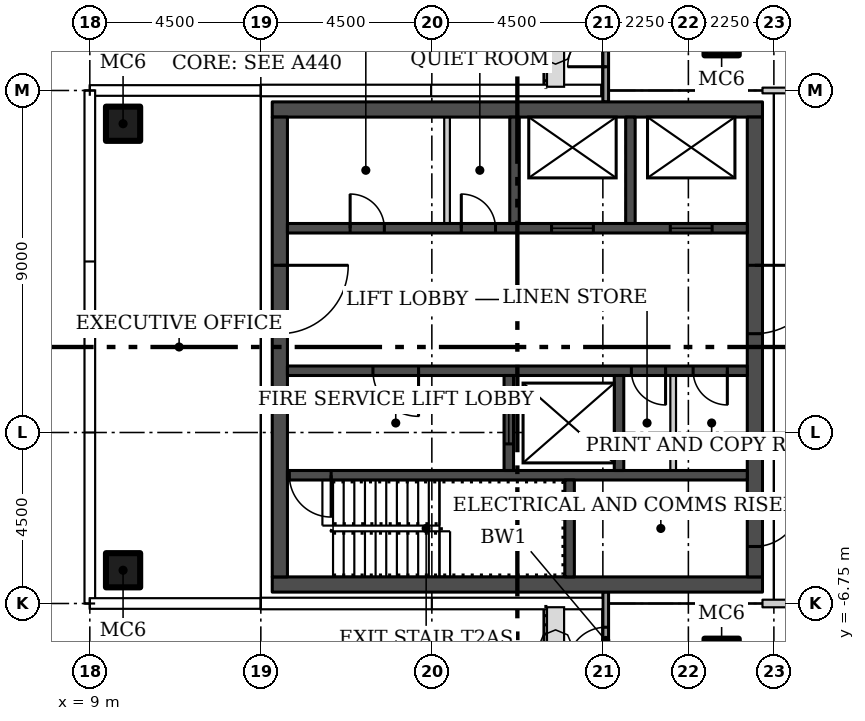
"""IFC4 building model, lengths in metres.
Left out: names, types, materials, properties, quantities, classifications, styles, units other than length and angle.
Written with IfcOpenShell. Run it as: python <this file> out.ifc"""

import sys

from ifc_helpers import new_model, si_unit, direction, frame, frame_2d, origin, origin_2d, place, context, subcontext, project, spatial, rectangle, hollow_rectangle, extrude, element, fill, save


model = new_model("IFC4")
c1 = context("Model", 3, precision=1e-05, world=origin(), true_north=direction((0.0, 1.0)))
c2 = subcontext(c1, "Body", "Model", "MODEL_VIEW")
j1 = project(units=[si_unit("LENGTHUNIT", "METRE"), si_unit("PLANEANGLEUNIT", "RADIAN")], contexts=[c1])
p1 = place(None, origin())
s1 = spatial("IfcSite", under=j1, at=p1, CompositionType="ELEMENT")
p2 = place(p1, origin())
s2 = spatial("IfcBuilding", under=s1, at=p2, CompositionType="ELEMENT")
p3 = place(p2, frame((0.0, 0.0, 242.1)))
s3 = spatial("IfcBuildingStorey", under=s2, at=p3, CompositionType="ELEMENT", Elevation=242.1)
for number, where in (
    (1, (25.625, 8.125, 0.0)),
    (2, (25.625, -8.125, 0.0)),
    (3, (9.875, -5.875, 0.0)),
    (4, (9.875, 5.875, 0.0)),
):
    element("IfcColumn", number, at=place(p3, frame(where)), inside=s3, PredefinedType="COLUMN", context=c2, shape_type="SweptSolid", body=[
        extrude(hollow_rectangle(XDim=0.9, YDim=0.9, WallThickness=0.036, at=origin_2d()), origin(), (0.0, 0.0, 1.0), 3.55),
    ])
p4 = place(p3, frame((26.7, 6.75, 0.0)))
e5 = element("IfcWall", 5, at=p4, inside=s3, PredefinedType="PARTITIONING", context=c2, shape_type="SweptSolid", body=[
    extrude(rectangle(XDim=14.1, YDim=0.15, at=frame_2d((7.05, 0.0))), origin(), (0.0, 0.0, 1.0), 3.55),
])
p5 = place(p4, frame((6.3, 0.0, 0.0)))
e6 = element("IfcOpeningElement", 6, at=p5, cuts=e5, PredefinedType="OPENING", context=c2, shape_type="SweptSolid", body=[
    extrude(rectangle(XDim=1.5, YDim=2.1, at=frame_2d((0.75, 1.05))), frame((0.0, 0.085, 0.0), z_axis=(0.0, -1.0, 0.0), x_axis=(1.0, 0.0, 0.0)), (0.0, 0.0, 1.0), 0.17),
])
p6 = place(p3, frame((26.7, -6.75, 0.0)))
e7 = element("IfcWall", 7, at=p6, inside=s3, PredefinedType="PARTITIONING", context=c2, shape_type="SweptSolid", body=[
    extrude(rectangle(XDim=9.4, YDim=0.2, at=frame_2d((4.7, 0.0))), origin(), (0.0, 0.0, 1.0), 3.55),
])
p7 = place(p6, frame((6.75, 0.0, 0.0)))
e8 = element("IfcOpeningElement", 8, at=p7, cuts=e7, PredefinedType="OPENING", context=c2, shape_type="SweptSolid", body=[
    extrude(rectangle(XDim=1.5, YDim=2.4, at=frame_2d((0.75, 1.2))), frame((0.0, 0.11, 0.0), z_axis=(0.0, -1.0, 0.0), x_axis=(1.0, 0.0, 0.0)), (0.0, 0.0, 1.0), 0.22),
])
p8 = place(p6, frame((1.35, 0.0, 0.0)))
e9 = element("IfcOpeningElement", 9, at=p8, cuts=e7, PredefinedType="OPENING", context=c2, shape_type="SweptSolid", body=[
    extrude(rectangle(XDim=1.5, YDim=2.4, at=frame_2d((0.75, 1.2))), frame((0.0, 0.11, 0.0), z_axis=(0.0, -1.0, 0.0), x_axis=(1.0, 0.0, 0.0)), (0.0, 0.0, 1.0), 0.22),
])
p9 = place(p3, frame((22.575, 6.448, 0.0), z_axis=(0.0, 0.0, 1.0), x_axis=(0.0, 1.0, 0.0)))
e10 = element("IfcWall", 10, at=p9, inside=s3, PredefinedType="SOLIDWALL", context=c2, shape_type="SweptSolid", body=[
    extrude(rectangle(XDim=2.552, YDim=0.15, at=frame_2d((1.276, 0.0))), origin(), (0.0, 0.0, 1.0), 3.45),
])
p10 = place(p9, frame((0.927, 0.0, 0.0)))
e11 = element("IfcOpeningElement", 11, at=p10, cuts=e10, PredefinedType="OPENING", context=c2, shape_type="SweptSolid", body=[
    extrude(rectangle(XDim=1.0, YDim=2.4, at=frame_2d((0.5, 1.2))), frame((0.0, 0.085, 0.0), z_axis=(0.0, -1.0, 0.0), x_axis=(1.0, 0.0, 0.0)), (0.0, 0.0, 1.0), 0.17),
])
p11 = place(p3, frame((22.575, -9.0, 0.0), z_axis=(0.0, 0.0, 1.0), x_axis=(0.0, 1.0, 0.0)))
e12 = element("IfcWall", 12, at=p11, inside=s3, PredefinedType="SOLIDWALL", context=c2, shape_type="SweptSolid", body=[
    extrude(rectangle(XDim=2.557, YDim=0.15, at=frame_2d((1.278, 0.0))), origin(), (0.0, 0.0, 1.0), 3.45),
])
p12 = place(p11, frame((0.625, 0.0, 0.0)))
e13 = element("IfcOpeningElement", 13, at=p12, cuts=e12, PredefinedType="OPENING", context=c2, shape_type="SweptSolid", body=[
    extrude(rectangle(XDim=1.0, YDim=2.4, at=frame_2d((0.5, 1.2))), frame((0.0, 0.085, 0.0), z_axis=(0.0, -1.0, 0.0), x_axis=(1.0, 0.0, 0.0)), (0.0, 0.0, 1.0), 0.17),
])
for number, where in (
    (14, (13.8, -6.25, 0.0)),
    (15, (13.8, 6.25, 0.0)),
):
    element("IfcWall", number, at=place(p3, frame(where)), inside=s3, PredefinedType="SHEAR", context=c2, shape_type="SweptSolid", body=[
        extrude(rectangle(XDim=12.9, YDim=0.4, at=frame_2d((6.45, 0.0))), origin(), (0.0, 0.0, 1.0), 3.55),
    ])
p13 = place(p3, frame((14.0, 6.05, 0.0), z_axis=(0.0, 0.0, 1.0), x_axis=(0.0, -1.0, 0.0)))
e16 = element("IfcWall", 16, at=p13, inside=s3, PredefinedType="SHEAR", context=c2, shape_type="SweptSolid", body=[
    extrude(rectangle(XDim=12.1, YDim=0.4, at=frame_2d((6.05, 0.0))), origin(), (0.0, 0.0, 1.0), 3.55),
])
p14 = place(p13, frame((3.9, 0.0, 0.0)))
e17 = element("IfcOpeningElement", 17, at=p14, cuts=e16, PredefinedType="OPENING", context=c2, shape_type="SweptSolid", body=[
    extrude(rectangle(XDim=1.8, YDim=2.4, at=frame_2d((0.9, 1.2))), frame((0.0, 0.21, 0.0), z_axis=(0.0, -1.0, 0.0), x_axis=(1.0, 0.0, 0.0)), (0.0, 0.0, 1.0), 0.42),
])
p15 = place(p3, frame((26.5, 6.05, 0.0), z_axis=(0.0, 0.0, 1.0), x_axis=(0.0, -1.0, 0.0)))
e18 = element("IfcWall", 18, at=p15, inside=s3, PredefinedType="SHEAR", context=c2, shape_type="SweptSolid", body=[
    extrude(rectangle(XDim=12.1, YDim=0.4, at=frame_2d((6.05, 0.0))), origin(), (0.0, 0.0, 1.0), 3.55),
])
p16 = place(p15, frame((10.1, 0.0, 0.0)))
e19 = element("IfcOpeningElement", 19, at=p16, cuts=e18, PredefinedType="OPENING", context=c2, shape_type="SweptSolid", body=[
    extrude(rectangle(XDim=1.2, YDim=2.1, at=frame_2d((0.6, 1.05))), frame((0.0, 0.21, 0.0), z_axis=(0.0, -1.0, 0.0), x_axis=(1.0, 0.0, 0.0)), (0.0, 0.0, 1.0), 0.42),
])
p17 = place(p15, frame((3.9, 0.0, 0.0)))
e20 = element("IfcOpeningElement", 20, at=p17, cuts=e18, PredefinedType="OPENING", context=c2, shape_type="SweptSolid", body=[
    extrude(rectangle(XDim=1.8, YDim=2.4, at=frame_2d((0.9, 1.2))), frame((0.0, 0.21, 0.0), z_axis=(0.0, -1.0, 0.0), x_axis=(1.0, 0.0, 0.0)), (0.0, 0.0, 1.0), 0.42),
])
p18 = place(p3, frame((26.3, -3.375, 0.0), z_axis=(0.0, 0.0, 1.0), x_axis=(-1.0, 0.0, 0.0)))
e21 = element("IfcWall", 21, at=p18, inside=s3, PredefinedType="SHEAR", context=c2, shape_type="SweptSolid", body=[
    extrude(rectangle(XDim=12.1, YDim=0.25, at=frame_2d((6.05, 0.0))), origin(), (0.0, 0.0, 1.0), 3.55),
])
p19 = place(p18, frame((10.95, 0.0, 0.0)))
e22 = element("IfcOpeningElement", 22, at=p19, cuts=e21, PredefinedType="OPENING", context=c2, shape_type="SweptSolid", body=[
    extrude(rectangle(XDim=1.1, YDim=2.1, at=frame_2d((0.55, 1.05))), frame((0.0, 0.135, 0.0), z_axis=(0.0, -1.0, 0.0), x_axis=(1.0, 0.0, 0.0)), (0.0, 0.0, 1.0), 0.27),
])
p20 = place(p3, frame((21.625, -6.05, 0.0), z_axis=(0.0, 0.0, 1.0), x_axis=(0.0, 1.0, 0.0)))
e23 = element("IfcWall", 23, at=p20, inside=s3, PredefinedType="SHEAR", context=c2, shape_type="SweptSolid", body=[
    extrude(rectangle(XDim=2.55, YDim=0.25, at=frame_2d((1.275, 0.0))), origin(), (0.0, 0.0, 1.0), 3.55),
])
p21 = place(p3, frame((26.3, -0.625, 0.0), z_axis=(0.0, 0.0, 1.0), x_axis=(-1.0, 0.0, 0.0)))
e24 = element("IfcWall", 24, at=p21, inside=s3, PredefinedType="SHEAR", context=c2, shape_type="SweptSolid", body=[
    extrude(rectangle(XDim=12.1, YDim=0.25, at=frame_2d((6.05, 0.0))), origin(), (0.0, 0.0, 1.0), 3.55),
])
p22 = place(p21, frame((8.65, 0.0, 0.0)))
e25 = element("IfcOpeningElement", 25, at=p22, cuts=e24, PredefinedType="OPENING", context=c2, shape_type="SweptSolid", body=[
    extrude(rectangle(XDim=1.2, YDim=2.1, at=frame_2d((0.6, 1.05))), frame((0.0, 0.135, 0.0), z_axis=(0.0, -1.0, 0.0), x_axis=(1.0, 0.0, 0.0)), (0.0, 0.0, 1.0), 0.27),
])
p23 = place(p21, frame((2.15, 0.0, 0.0)))
e26 = element("IfcOpeningElement", 26, at=p23, cuts=e24, PredefinedType="OPENING", context=c2, shape_type="SweptSolid", body=[
    extrude(rectangle(XDim=0.9, YDim=2.1, at=frame_2d((0.45, 1.05))), frame((0.0, 0.135, 0.0), z_axis=(0.0, -1.0, 0.0), x_axis=(1.0, 0.0, 0.0)), (0.0, 0.0, 1.0), 0.27),
])
p24 = place(p21, frame((0.525, 0.0, 0.0)))
e27 = element("IfcOpeningElement", 27, at=p24, cuts=e24, PredefinedType="OPENING", context=c2, shape_type="SweptSolid", body=[
    extrude(rectangle(XDim=0.9, YDim=2.1, at=frame_2d((0.45, 1.05))), frame((0.0, 0.135, 0.0), z_axis=(0.0, -1.0, 0.0), x_axis=(1.0, 0.0, 0.0)), (0.0, 0.0, 1.0), 0.27),
])
p25 = place(p3, frame((20.025, -3.25, 0.0), z_axis=(0.0, 0.0, 1.0), x_axis=(0.0, 1.0, 0.0)))
e28 = element("IfcWall", 28, at=p25, inside=s3, PredefinedType="SHEAR", context=c2, shape_type="SweptSolid", body=[
    extrude(rectangle(XDim=2.5, YDim=0.25, at=frame_2d((1.25, 0.0))), origin(), (0.0, 0.0, 1.0), 3.55),
])
p26 = place(p25, frame((0.7, 0.0, 0.0)))
e29 = element("IfcOpeningElement", 29, at=p26, cuts=e28, PredefinedType="OPENING", context=c2, shape_type="SweptSolid", body=[
    extrude(rectangle(XDim=1.1, YDim=2.1, at=frame_2d((0.55, 1.05))), frame((0.0, 0.135, 0.0), z_axis=(0.0, -1.0, 0.0), x_axis=(1.0, 0.0, 0.0)), (0.0, 0.0, 1.0), 0.27),
])
p27 = place(p3, frame((22.925, -3.25, 0.0), z_axis=(0.0, 0.0, 1.0), x_axis=(0.0, 1.0, 0.0)))
e30 = element("IfcWall", 30, at=p27, inside=s3, PredefinedType="SHEAR", context=c2, shape_type="SweptSolid", body=[
    extrude(rectangle(XDim=2.5, YDim=0.25, at=frame_2d((1.25, 0.0))), origin(), (0.0, 0.0, 1.0), 3.55),
])
p28 = place(p3, frame((24.35, -3.25, 0.0), z_axis=(0.0, 0.0, 1.0), x_axis=(0.0, 1.0, 0.0)))
e31 = element("IfcWall", 31, at=p28, inside=s3, PredefinedType="PARTITIONING", context=c2, shape_type="SweptSolid", body=[
    extrude(rectangle(XDim=2.5, YDim=0.15, at=frame_2d((1.25, 0.0))), origin(), (0.0, 0.0, 1.0), 3.55),
])
p29 = place(p3, frame((14.2, 3.125, 0.0)))
e32 = element("IfcWall", 32, at=p29, inside=s3, PredefinedType="SHEAR", context=c2, shape_type="SweptSolid", body=[
    extrude(rectangle(XDim=12.1, YDim=0.25, at=frame_2d((6.05, 0.0))), origin(), (0.0, 0.0, 1.0), 3.55),
])
p30 = place(p29, frame((6.95, 0.0, 0.0)))
e33 = element("IfcOpeningElement", 33, at=p30, cuts=e32, PredefinedType="OPENING", context=c2, shape_type="SweptSolid", body=[
    extrude(rectangle(XDim=1.1, YDim=2.1, at=frame_2d((0.55, 1.05))), frame((0.0, 0.135, 0.0), z_axis=(0.0, -1.0, 0.0), x_axis=(1.0, 0.0, 0.0)), (0.0, 0.0, 1.0), 0.27),
])
p31 = place(p29, frame((10.075, 0.0, 0.0)))
e34 = element("IfcOpeningElement", 34, at=p31, cuts=e32, PredefinedType="OPENING", context=c2, shape_type="SweptSolid", body=[
    extrude(rectangle(XDim=1.1, YDim=2.1, at=frame_2d((0.55, 1.05))), frame((0.0, 0.135, 0.0), z_axis=(0.0, -1.0, 0.0), x_axis=(1.0, 0.0, 0.0)), (0.0, 0.0, 1.0), 0.27),
])
p32 = place(p29, frame((1.65, 0.0, 0.0)))
e35 = element("IfcOpeningElement", 35, at=p32, cuts=e32, PredefinedType="OPENING", context=c2, shape_type="SweptSolid", body=[
    extrude(rectangle(XDim=0.9, YDim=2.1, at=frame_2d((0.45, 1.05))), frame((0.0, 0.135, 0.0), z_axis=(0.0, -1.0, 0.0), x_axis=(1.0, 0.0, 0.0)), (0.0, 0.0, 1.0), 0.27),
])
p33 = place(p29, frame((4.575, 0.0, 0.0)))
e36 = element("IfcOpeningElement", 36, at=p33, cuts=e32, PredefinedType="OPENING", context=c2, shape_type="SweptSolid", body=[
    extrude(rectangle(XDim=0.9, YDim=2.1, at=frame_2d((0.45, 1.05))), frame((0.0, 0.135, 0.0), z_axis=(0.0, -1.0, 0.0), x_axis=(1.0, 0.0, 0.0)), (0.0, 0.0, 1.0), 0.27),
])
for number, where, z_axis, x_axis in (
    (37, (20.175, 3.25, 0.0), (0.0, 0.0, 1.0), (0.0, 1.0, 0.0)),
    (38, (23.225, 3.25, 0.0), (0.0, 0.0, 1.0), (0.0, 1.0, 0.0)),
):
    element("IfcWall", number, at=place(p3, frame(where, z_axis=z_axis, x_axis=x_axis)), inside=s3, PredefinedType="SHEAR", context=c2, shape_type="SweptSolid", body=[
        extrude(rectangle(XDim=2.8, YDim=0.25, at=frame_2d((1.4, 0.0))), origin(), (0.0, 0.0, 1.0), 3.55),
    ])
p34 = place(p3, frame((18.4, 3.25, 0.0), z_axis=(0.0, 0.0, 1.0), x_axis=(0.0, 1.0, 0.0)))
e39 = element("IfcWall", 39, at=p34, inside=s3, PredefinedType="PARTITIONING", context=c2, shape_type="SweptSolid", body=[
    extrude(rectangle(XDim=2.8, YDim=0.15, at=frame_2d((1.4, 0.0))), origin(), (0.0, 0.0, 1.0), 3.55),
])
p35 = place(p10, origin())
e40 = element("IfcDoor", 40, at=p35, inside=s3, OperationType="SINGLE_SWING_LEFT", PredefinedType="DOOR", context=c2, shape_type="SweptSolid", body=[
    extrude(rectangle(XDim=1.0, YDim=2.4, at=frame_2d((0.5, 1.2))), frame((0.0, 0.025, 0.0), z_axis=(0.0, -1.0, 0.0), x_axis=(1.0, 0.0, 0.0)), (0.0, 0.0, 1.0), 0.05),
])
fill(e11, e40)
p36 = place(p12, origin())
e41 = element("IfcDoor", 41, at=p36, inside=s3, OperationType="SINGLE_SWING_LEFT", PredefinedType="DOOR", context=c2, shape_type="SweptSolid", body=[
    extrude(rectangle(XDim=1.0, YDim=2.4, at=frame_2d((0.5, 1.2))), frame((0.0, 0.025, 0.0), z_axis=(0.0, -1.0, 0.0), x_axis=(1.0, 0.0, 0.0)), (0.0, 0.0, 1.0), 0.05),
])
fill(e13, e41)
p37 = place(p14, origin())
e42 = element("IfcDoor", 42, at=p37, inside=s3, OperationType="DOUBLE_DOOR_SINGLE_SWING", PredefinedType="DOOR", context=c2, shape_type="SweptSolid", body=[
    extrude(rectangle(XDim=1.8, YDim=2.4, at=frame_2d((0.9, 1.2))), frame((0.0, 0.025, 0.0), z_axis=(0.0, -1.0, 0.0), x_axis=(1.0, 0.0, 0.0)), (0.0, 0.0, 1.0), 0.05),
])
fill(e17, e42)
p38 = place(p16, origin())
e43 = element("IfcDoor", 43, at=p38, inside=s3, OperationType="SINGLE_SWING_RIGHT", PredefinedType="DOOR", context=c2, shape_type="SweptSolid", body=[
    extrude(rectangle(XDim=1.2, YDim=2.1, at=frame_2d((0.6, 1.05))), frame((0.0, 0.025, 0.0), z_axis=(0.0, -1.0, 0.0), x_axis=(1.0, 0.0, 0.0)), (0.0, 0.0, 1.0), 0.05),
])
fill(e19, e43)
p39 = place(p17, origin())
e44 = element("IfcDoor", 44, at=p39, inside=s3, OperationType="DOUBLE_DOOR_SINGLE_SWING", PredefinedType="DOOR", context=c2, shape_type="SweptSolid", body=[
    extrude(rectangle(XDim=1.8, YDim=2.4, at=frame_2d((0.9, 1.2))), frame((0.0, 0.025, 0.0), z_axis=(0.0, -1.0, 0.0), x_axis=(1.0, 0.0, 0.0)), (0.0, 0.0, 1.0), 0.05),
])
fill(e20, e44)
p40 = place(p19, origin())
e45 = element("IfcDoor", 45, at=p40, inside=s3, OperationType="SINGLE_SWING_RIGHT", PredefinedType="DOOR", context=c2, shape_type="SweptSolid", body=[
    extrude(rectangle(XDim=1.1, YDim=2.1, at=frame_2d((0.55, 1.05))), frame((0.0, 0.025, 0.0), z_axis=(0.0, -1.0, 0.0), x_axis=(1.0, 0.0, 0.0)), (0.0, 0.0, 1.0), 0.05),
])
fill(e22, e45)
p41 = place(p22, origin())
e46 = element("IfcDoor", 46, at=p41, inside=s3, OperationType="SINGLE_SWING_RIGHT", PredefinedType="DOOR", context=c2, shape_type="SweptSolid", body=[
    extrude(rectangle(XDim=1.2, YDim=2.1, at=frame_2d((0.6, 1.05))), frame((0.0, 0.025, 0.0), z_axis=(0.0, -1.0, 0.0), x_axis=(1.0, 0.0, 0.0)), (0.0, 0.0, 1.0), 0.05),
])
fill(e25, e46)
p42 = place(p23, origin())
e47 = element("IfcDoor", 47, at=p42, inside=s3, OperationType="SINGLE_SWING_LEFT", PredefinedType="DOOR", context=c2, shape_type="SweptSolid", body=[
    extrude(rectangle(XDim=0.9, YDim=2.1, at=frame_2d((0.45, 1.05))), frame((0.0, 0.025, 0.0), z_axis=(0.0, -1.0, 0.0), x_axis=(1.0, 0.0, 0.0)), (0.0, 0.0, 1.0), 0.05),
])
fill(e26, e47)
p43 = place(p24, origin())
e48 = element("IfcDoor", 48, at=p43, inside=s3, OperationType="SINGLE_SWING_LEFT", PredefinedType="DOOR", context=c2, shape_type="SweptSolid", body=[
    extrude(rectangle(XDim=0.9, YDim=2.1, at=frame_2d((0.45, 1.05))), frame((0.0, 0.025, 0.0), z_axis=(0.0, -1.0, 0.0), x_axis=(1.0, 0.0, 0.0)), (0.0, 0.0, 1.0), 0.05),
])
fill(e27, e48)
p44 = place(p26, origin())
e49 = element("IfcDoor", 49, at=p44, inside=s3, OperationType="SLIDING_TO_LEFT", PredefinedType="DOOR", context=c2, shape_type="SweptSolid", body=[
    extrude(rectangle(XDim=1.1, YDim=2.1, at=frame_2d((0.55, 1.05))), frame((0.0, 0.025, 0.0), z_axis=(0.0, -1.0, 0.0), x_axis=(1.0, 0.0, 0.0)), (0.0, 0.0, 1.0), 0.05),
])
fill(e29, e49)
p45 = place(p30, origin())
e50 = element("IfcDoor", 50, at=p45, inside=s3, OperationType="SLIDING_TO_LEFT", PredefinedType="DOOR", context=c2, shape_type="SweptSolid", body=[
    extrude(rectangle(XDim=1.1, YDim=2.1, at=frame_2d((0.55, 1.05))), frame((0.0, 0.025, 0.0), z_axis=(0.0, -1.0, 0.0), x_axis=(1.0, 0.0, 0.0)), (0.0, 0.0, 1.0), 0.05),
])
fill(e33, e50)
p46 = place(p31, origin())
e51 = element("IfcDoor", 51, at=p46, inside=s3, OperationType="SLIDING_TO_LEFT", PredefinedType="DOOR", context=c2, shape_type="SweptSolid", body=[
    extrude(rectangle(XDim=1.1, YDim=2.1, at=frame_2d((0.55, 1.05))), frame((0.0, 0.025, 0.0), z_axis=(0.0, -1.0, 0.0), x_axis=(1.0, 0.0, 0.0)), (0.0, 0.0, 1.0), 0.05),
])
fill(e34, e51)
p47 = place(p32, origin())
e52 = element("IfcDoor", 52, at=p47, inside=s3, OperationType="SINGLE_SWING_LEFT", PredefinedType="DOOR", context=c2, shape_type="SweptSolid", body=[
    extrude(rectangle(XDim=0.9, YDim=2.1, at=frame_2d((0.45, 1.05))), frame((0.0, 0.025, 0.0), z_axis=(0.0, -1.0, 0.0), x_axis=(1.0, 0.0, 0.0)), (0.0, 0.0, 1.0), 0.05),
])
fill(e35, e52)
p48 = place(p33, origin())
e53 = element("IfcDoor", 53, at=p48, inside=s3, OperationType="SINGLE_SWING_LEFT", PredefinedType="DOOR", context=c2, shape_type="SweptSolid", body=[
    extrude(rectangle(XDim=0.9, YDim=2.1, at=frame_2d((0.45, 1.05))), frame((0.0, 0.025, 0.0), z_axis=(0.0, -1.0, 0.0), x_axis=(1.0, 0.0, 0.0)), (0.0, 0.0, 1.0), 0.05),
])
fill(e36, e53)
save(model, sys.argv[1])
